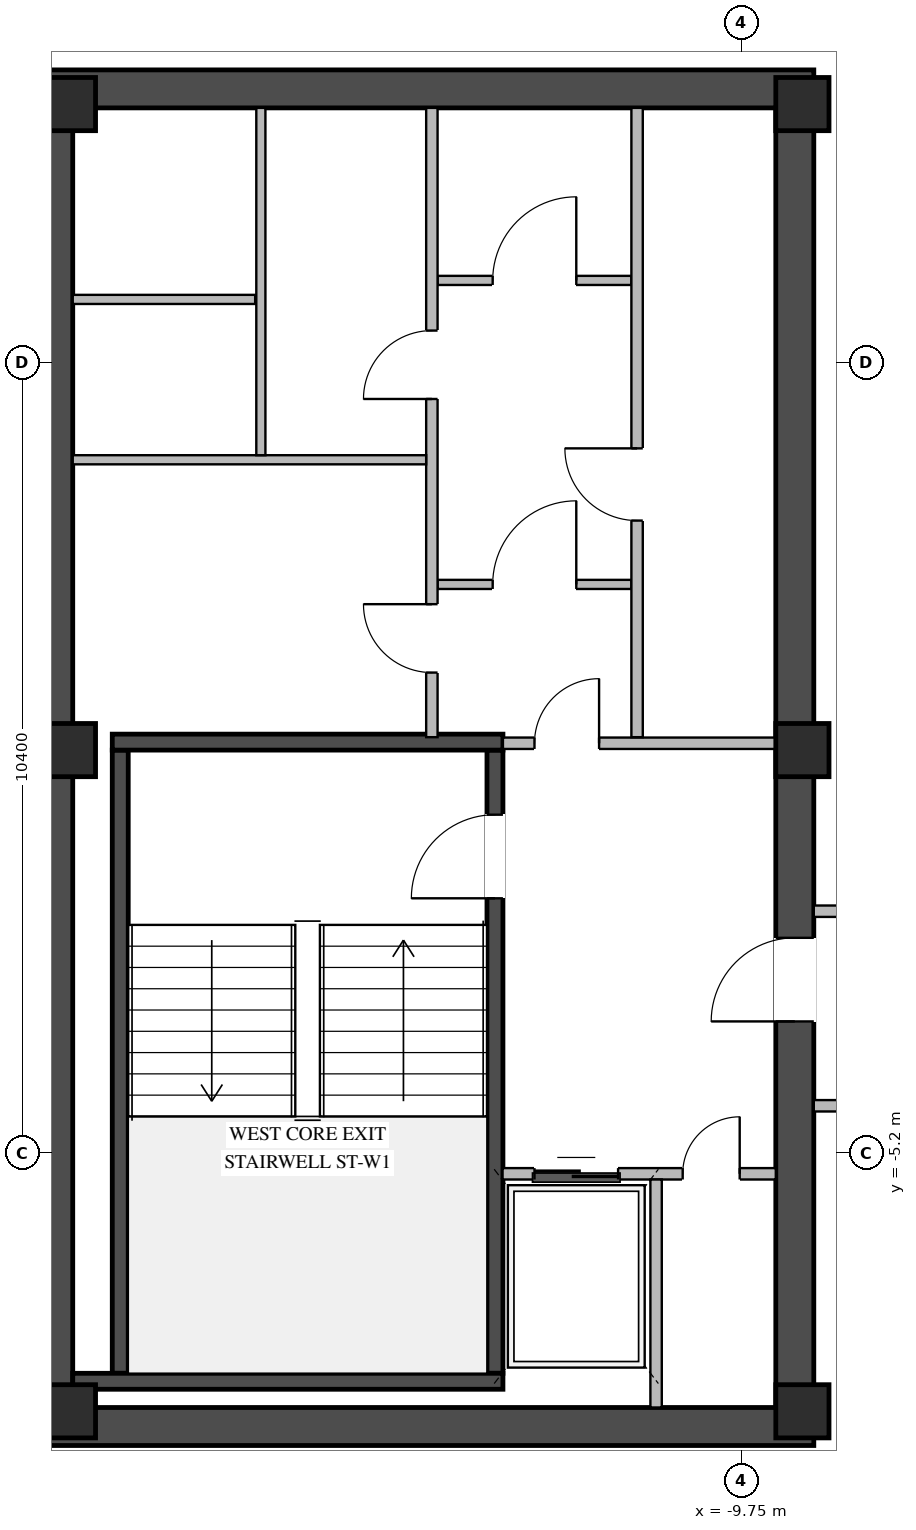
"""IFC4 building model, lengths in metres.
Left out: names, types, materials, properties, quantities, classifications, styles, units other than length and angle.
Written with IfcOpenShell. Run it as: python <this file> out.ifc"""

import sys

from ifc_helpers import new_model, si_unit, direction, frame, frame_2d, origin, origin_2d, place, context, subcontext, project, spatial, rectangle, extrude, element, fill, save


model = new_model("IFC4")
c1 = context("Model", 3, precision=1e-05, world=origin(), true_north=direction((0.0, 1.0)))
c2 = subcontext(c1, "Body", "Model", "MODEL_VIEW")
j1 = project(units=[si_unit("LENGTHUNIT", "METRE"), si_unit("PLANEANGLEUNIT", "RADIAN")], contexts=[c1])
p1 = place(None, origin())
s1 = spatial("IfcSite", under=j1, at=p1, CompositionType="ELEMENT")
p2 = place(p1, origin())
s2 = spatial("IfcBuilding", under=s1, at=p2, CompositionType="ELEMENT")
p3 = place(p2, frame((0.0, 0.0, 297.75)))
s3 = spatial("IfcBuildingStorey", under=s2, at=p3, CompositionType="ELEMENT", Elevation=297.75)
for number, where, z_axis, x_axis in (
    (1, (-19.05, -8.8, 0.0), (0.0, 0.0, 1.0), (1.0, 0.0, 0.0)),
    (2, (-19.05, 8.8, 0.0), (0.0, 0.0, 1.0), (1.0, 0.0, 0.0)),
):
    element("IfcWall", number, at=place(p3, frame(where, z_axis=z_axis, x_axis=x_axis)), inside=s3, PredefinedType="SHEAR", context=c2, shape_type="SweptSolid", body=[
        extrude(rectangle(XDim=10.25, YDim=0.5, at=frame_2d((5.125, 0.0))), origin(), (0.0, 0.0, 1.0), 3.35),
    ])
p4 = place(p3, frame((-18.8, -8.55, 0.0), z_axis=(0.0, 0.0, 1.0), x_axis=(0.0, 1.0, 0.0)))
e3 = element("IfcWall", 3, at=p4, inside=s3, PredefinedType="SHEAR", context=c2, shape_type="SweptSolid", body=[
    extrude(rectangle(XDim=17.1, YDim=0.5, at=frame_2d((8.55, 0.0))), origin(), (0.0, 0.0, 1.0), 3.35),
])
p5 = place(p3, frame((-9.05, -8.55, 0.0), z_axis=(0.0, 0.0, 1.0), x_axis=(0.0, 1.0, 0.0)))
e4 = element("IfcWall", 4, at=p5, inside=s3, PredefinedType="SHEAR", context=c2, shape_type="SweptSolid", body=[
    extrude(rectangle(XDim=17.1, YDim=0.5, at=frame_2d((8.55, 0.0))), origin(), (0.0, 0.0, 1.0), 3.35),
])
p6 = place(p5, frame((5.08, 0.0, 0.0)))
e5 = element("IfcOpeningElement", 5, at=p6, cuts=e4, PredefinedType="OPENING", context=c2, shape_type="SweptSolid", body=[
    extrude(rectangle(XDim=1.1, YDim=2.08, at=frame_2d((0.55, 1.04))), frame((0.0, 0.26, 0.0), z_axis=(0.0, -1.0, 0.0), x_axis=(1.0, 0.0, 0.0)), (0.0, 0.0, 1.0), 0.52),
])
p7 = place(p3, frame((-12.995, -8.1, 0.0), z_axis=(0.0, 0.0, 1.0), x_axis=(0.0, 1.0, 0.0)))
e6 = element("IfcWall", 6, at=p7, inside=s3, PredefinedType="SHEAR", context=c2, shape_type="SweptSolid", body=[
    extrude(rectangle(XDim=8.2, YDim=0.21, at=frame_2d((4.1, 0.0))), origin(), (0.0, 0.0, 1.0), 3.35),
])
p8 = place(p7, frame((6.25, 0.0, 0.0)))
e7 = element("IfcOpeningElement", 7, at=p8, cuts=e6, PredefinedType="OPENING", context=c2, shape_type="SweptSolid", body=[
    extrude(rectangle(XDim=1.1, YDim=2.15, at=frame_2d((0.55, 1.075))), frame((0.0, 0.115, 0.0), z_axis=(0.0, -1.0, 0.0), x_axis=(1.0, 0.0, 0.0)), (0.0, 0.0, 1.0), 0.23),
])
p9 = place(p3, frame((-17.925, -8.1, 0.0), z_axis=(0.0, 0.0, 1.0), x_axis=(0.0, 1.0, 0.0)))
e8 = element("IfcWall", 8, at=p9, inside=s3, PredefinedType="SHEAR", context=c2, shape_type="SweptSolid", body=[
    extrude(rectangle(XDim=8.2, YDim=0.21, at=frame_2d((4.1, 0.0))), origin(), (0.0, 0.0, 1.0), 3.35),
])
p10 = place(p3, frame((-18.55, -8.205, 0.0), z_axis=(0.0, 0.0, 1.0), x_axis=(1.0, 0.0, 0.0)))
e9 = element("IfcWall", 9, at=p10, inside=s3, PredefinedType="SHEAR", context=c2, shape_type="SweptSolid", body=[
    extrude(rectangle(XDim=5.66, YDim=0.21, at=frame_2d((2.83, 0.0))), origin(), (0.0, 0.0, 1.0), 3.35),
])
p11 = place(p3, frame((-12.89, 0.205, 0.0), z_axis=(0.0, 0.0, 1.0), x_axis=(-1.0, 0.0, 0.0)))
e10 = element("IfcWall", 10, at=p11, inside=s3, PredefinedType="SHEAR", context=c2, shape_type="SweptSolid", body=[
    extrude(rectangle(XDim=5.14, YDim=0.21, at=frame_2d((2.57, 0.0))), origin(), (0.0, 0.0, 1.0), 3.35),
])
for number, where, z_axis, x_axis in (
    (11, (-8.95, -8.6, 0.0), (0.0, 0.0, 1.0), (1.0, 0.0, 0.0)),
    (12, (-8.95, 0.1, 0.0), (0.0, 0.0, 1.0), (1.0, 0.0, 0.0)),
    (13, (-8.95, 8.6, 0.0), (0.0, 0.0, 1.0), (1.0, 0.0, 0.0)),
    (14, (-18.6, -8.6, 0.0), (0.0, 0.0, 1.0), (1.0, 0.0, 0.0)),
    (15, (-18.6, 0.1, 0.0), (0.0, 0.0, 1.0), (1.0, 0.0, 0.0)),
    (16, (-18.6, 8.6, 0.0), (0.0, 0.0, 1.0), (1.0, 0.0, 0.0)),
):
    element("IfcColumn", number, at=place(p3, frame(where, z_axis=z_axis, x_axis=x_axis)), inside=s3, PredefinedType="COLUMN", context=c2, shape_type="SweptSolid", body=[
        extrude(rectangle(XDim=0.7, YDim=0.7, at=origin_2d()), origin(), (0.0, 0.0, 1.0), 3.6),
    ])
p12 = place(p3, frame((-12.895, -5.475, 0.0), z_axis=(0.0, 0.0, 1.0), x_axis=(1.0, 0.0, 0.0)))
e17 = element("IfcWall", 17, at=p12, inside=s3, PredefinedType="STANDARD", context=c2, shape_type="SweptSolid", body=[
    extrude(rectangle(XDim=3.595, YDim=0.15, at=frame_2d((1.797, 0.0))), origin(), (0.0, 0.0, 1.0), 3.33),
])
p13 = place(p12, frame((0.42, 0.0, 0.0)))
e18 = element("IfcOpeningElement", 18, at=p13, cuts=e17, PredefinedType="OPENING", context=c2, shape_type="SweptSolid", body=[
    extrude(rectangle(XDim=1.1, YDim=2.15, at=frame_2d((0.55, 1.075))), frame((0.0, 0.085, 0.0), z_axis=(0.0, -1.0, 0.0), x_axis=(1.0, 0.0, 0.0)), (0.0, 0.0, 1.0), 0.17),
])
p14 = place(p12, frame((2.37, 0.0, 0.0)))
e19 = element("IfcOpeningElement", 19, at=p14, cuts=e17, PredefinedType="OPENING", context=c2, shape_type="SweptSolid", body=[
    extrude(rectangle(XDim=0.75, YDim=2.05, at=frame_2d((0.375, 1.025))), frame((0.0, 0.085, 0.0), z_axis=(0.0, -1.0, 0.0), x_axis=(1.0, 0.0, 0.0)), (0.0, 0.0, 1.0), 0.17),
])
p15 = place(p3, frame((-10.875, -8.55, 0.0), z_axis=(0.0, 0.0, 1.0), x_axis=(0.0, 1.0, 0.0)))
e20 = element("IfcWall", 20, at=p15, inside=s3, PredefinedType="STANDARD", context=c2, shape_type="SweptSolid", body=[
    extrude(rectangle(XDim=3.0, YDim=0.15, at=frame_2d((1.5, 0.0))), origin(), (0.0, 0.0, 1.0), 3.33),
])
p16 = place(p3, frame((-12.89, 0.19, 0.0), z_axis=(0.0, 0.0, 1.0), x_axis=(1.0, 0.0, 0.0)))
e21 = element("IfcWall", 21, at=p16, inside=s3, PredefinedType="STANDARD", context=c2, shape_type="SweptSolid", body=[
    extrude(rectangle(XDim=3.59, YDim=0.15, at=frame_2d((1.795, 0.0))), origin(), (0.0, 0.0, 1.0), 2.825),
])
p17 = place(p16, frame((0.415, 0.0, 0.0)))
e22 = element("IfcOpeningElement", 22, at=p17, cuts=e21, PredefinedType="OPENING", context=c2, shape_type="SweptSolid", body=[
    extrude(rectangle(XDim=0.85, YDim=2.04, at=frame_2d((0.425, 1.02))), frame((0.0, 0.085, 0.0), z_axis=(0.0, -1.0, 0.0), x_axis=(1.0, 0.0, 0.0)), (0.0, 0.0, 1.0), 0.17),
])
p18 = place(p3, frame((-13.75, 2.28, 0.0), z_axis=(0.0, 0.0, 1.0), x_axis=(1.0, 0.0, 0.0)))
e23 = element("IfcWall", 23, at=p18, inside=s3, PredefinedType="STANDARD", context=c2, shape_type="SweptSolid", body=[
    extrude(rectangle(XDim=2.55, YDim=0.12, at=frame_2d((1.275, 0.0))), origin(), (0.0, 0.0, 1.0), 3.33),
])
p19 = place(p18, frame((0.725, 0.0, 0.0)))
e24 = element("IfcOpeningElement", 24, at=p19, cuts=e23, PredefinedType="OPENING", context=c2, shape_type="SweptSolid", body=[
    extrude(rectangle(XDim=1.1, YDim=2.1, at=frame_2d((0.55, 1.05))), frame((0.0, 0.07, 0.0), z_axis=(0.0, -1.0, 0.0), x_axis=(1.0, 0.0, 0.0)), (0.0, 0.0, 1.0), 0.14),
])
p20 = place(p3, frame((-13.75, 6.28, 0.0), z_axis=(0.0, 0.0, 1.0), x_axis=(1.0, 0.0, 0.0)))
e25 = element("IfcWall", 25, at=p20, inside=s3, PredefinedType="STANDARD", context=c2, shape_type="SweptSolid", body=[
    extrude(rectangle(XDim=2.55, YDim=0.12, at=frame_2d((1.275, 0.0))), origin(), (0.0, 0.0, 1.0), 3.33),
])
p21 = place(p20, frame((0.725, 0.0, 0.0)))
e26 = element("IfcOpeningElement", 26, at=p21, cuts=e25, PredefinedType="OPENING", context=c2, shape_type="SweptSolid", body=[
    extrude(rectangle(XDim=1.1, YDim=2.1, at=frame_2d((0.55, 1.05))), frame((0.0, 0.07, 0.0), z_axis=(0.0, -1.0, 0.0), x_axis=(1.0, 0.0, 0.0)), (0.0, 0.0, 1.0), 0.14),
])
p22 = place(p3, frame((-11.125, 0.27, 0.0), z_axis=(0.0, 0.0, 1.0), x_axis=(0.0, 1.0, 0.0)))
e27 = element("IfcWall", 27, at=p22, inside=s3, PredefinedType="STANDARD", context=c2, shape_type="SweptSolid", body=[
    extrude(rectangle(XDim=8.28, YDim=0.15, at=frame_2d((4.14, 0.0))), origin(), (0.0, 0.0, 1.0), 3.33),
])
p23 = place(p22, frame((2.85, 0.0, 0.0)))
e28 = element("IfcOpeningElement", 28, at=p23, cuts=e27, PredefinedType="OPENING", context=c2, shape_type="SweptSolid", body=[
    extrude(rectangle(XDim=0.95, YDim=2.05, at=frame_2d((0.475, 1.025))), frame((0.0, 0.085, 0.0), z_axis=(0.0, -1.0, 0.0), x_axis=(1.0, 0.0, 0.0)), (0.0, 0.0, 1.0), 0.17),
])
p24 = place(p3, frame((-13.825, 0.27, 0.0), z_axis=(0.0, 0.0, 1.0), x_axis=(0.0, 1.0, 0.0)))
e29 = element("IfcWall", 29, at=p24, inside=s3, PredefinedType="STANDARD", context=c2, shape_type="SweptSolid", body=[
    extrude(rectangle(XDim=8.28, YDim=0.15, at=frame_2d((4.14, 0.0))), origin(), (0.0, 0.0, 1.0), 3.33),
])
p25 = place(p24, frame((4.45, 0.0, 0.0)))
e30 = element("IfcOpeningElement", 30, at=p25, cuts=e29, PredefinedType="OPENING", context=c2, shape_type="SweptSolid", body=[
    extrude(rectangle(XDim=0.9, YDim=2.05, at=frame_2d((0.45, 1.025))), frame((0.0, 0.085, 0.0), z_axis=(0.0, -1.0, 0.0), x_axis=(1.0, 0.0, 0.0)), (0.0, 0.0, 1.0), 0.17),
])
p26 = place(p24, frame((0.85, 0.0, 0.0)))
e31 = element("IfcOpeningElement", 31, at=p26, cuts=e29, PredefinedType="OPENING", context=c2, shape_type="SweptSolid", body=[
    extrude(rectangle(XDim=0.9, YDim=2.05, at=frame_2d((0.45, 1.025))), frame((0.0, 0.085, 0.0), z_axis=(0.0, -1.0, 0.0), x_axis=(1.0, 0.0, 0.0)), (0.0, 0.0, 1.0), 0.17),
])
p27 = place(p3, frame((-18.55, 3.92, 0.0), z_axis=(0.0, 0.0, 1.0), x_axis=(1.0, 0.0, 0.0)))
e32 = element("IfcWall", 32, at=p27, inside=s3, PredefinedType="STANDARD", context=c2, shape_type="SweptSolid", body=[
    extrude(rectangle(XDim=4.65, YDim=0.12, at=frame_2d((2.325, 0.0))), origin(), (0.0, 0.0, 1.0), 3.33),
])
p28 = place(p3, frame((-18.55, 6.03, 0.0), z_axis=(0.0, 0.0, 1.0), x_axis=(1.0, 0.0, 0.0)))
e33 = element("IfcWall", 33, at=p28, inside=s3, PredefinedType="STANDARD", context=c2, shape_type="SweptSolid", body=[
    extrude(rectangle(XDim=2.4, YDim=0.12, at=frame_2d((1.2, 0.0))), origin(), (0.0, 0.0, 1.0), 3.33),
])
p29 = place(p3, frame((-16.075, 3.98, 0.0), z_axis=(0.0, 0.0, 1.0), x_axis=(0.0, 1.0, 0.0)))
e34 = element("IfcWall", 34, at=p29, inside=s3, PredefinedType="STANDARD", context=c2, shape_type="SweptSolid", body=[
    extrude(rectangle(XDim=4.57, YDim=0.12, at=frame_2d((2.285, 0.0))), origin(), (0.0, 0.0, 1.0), 3.33),
])
p30 = place(p3, frame((-8.8, -2.02, 0.0), z_axis=(0.0, 0.0, 1.0), x_axis=(1.0, 0.0, 0.0)))
e35 = element("IfcWall", 35, at=p30, inside=s3, PredefinedType="STANDARD", context=c2, shape_type="SweptSolid", body=[
    extrude(rectangle(XDim=17.6, YDim=0.15, at=frame_2d((8.8, 0.0))), origin(), (0.0, 0.0, 1.0), 3.33),
])
p31 = place(p30, frame((4.6, 0.0, 0.0)))
e36 = element("IfcOpeningElement", 36, at=p31, cuts=e35, PredefinedType="OPENING", context=c2, shape_type="SweptSolid", body=[
    extrude(rectangle(XDim=1.0, YDim=2.02, at=frame_2d((0.5, 1.01))), frame((0.0, 0.085, 0.0), z_axis=(0.0, -1.0, 0.0), x_axis=(1.0, 0.0, 0.0)), (0.0, 0.0, 1.0), 0.17),
])
p32 = place(p30, frame((13.4, 0.0, 0.0)))
e37 = element("IfcOpeningElement", 37, at=p32, cuts=e35, PredefinedType="OPENING", context=c2, shape_type="SweptSolid", body=[
    extrude(rectangle(XDim=1.0, YDim=2.02, at=frame_2d((0.5, 1.01))), frame((0.0, 0.085, 0.0), z_axis=(0.0, -1.0, 0.0), x_axis=(1.0, 0.0, 0.0)), (0.0, 0.0, 1.0), 0.17),
])
p33 = place(p3, frame((-8.8, -4.58, 0.0), z_axis=(0.0, 0.0, 1.0), x_axis=(1.0, 0.0, 0.0)))
e38 = element("IfcWall", 38, at=p33, inside=s3, PredefinedType="STANDARD", context=c2, shape_type="SweptSolid", body=[
    extrude(rectangle(XDim=17.6, YDim=0.15, at=frame_2d((8.8, 0.0))), origin(), (0.0, 0.0, 1.0), 3.33),
])
p34 = place(p33, frame((4.6, 0.0, 0.0)))
e39 = element("IfcOpeningElement", 39, at=p34, cuts=e38, PredefinedType="OPENING", context=c2, shape_type="SweptSolid", body=[
    extrude(rectangle(XDim=1.0, YDim=2.02, at=frame_2d((0.5, 1.01))), frame((0.0, 0.085, 0.0), z_axis=(0.0, -1.0, 0.0), x_axis=(1.0, 0.0, 0.0)), (0.0, 0.0, 1.0), 0.17),
])
p35 = place(p8, origin())
e40 = element("IfcDoor", 40, at=p35, inside=s3, OperationType="SINGLE_SWING_LEFT", PredefinedType="DOOR", context=c2, shape_type="SweptSolid", body=[
    extrude(rectangle(XDim=1.1, YDim=2.15, at=frame_2d((0.55, 1.075))), frame((0.0, 0.025, 0.0), z_axis=(0.0, -1.0, 0.0), x_axis=(1.0, 0.0, 0.0)), (0.0, 0.0, 1.0), 0.05),
])
fill(e7, e40)
p36 = place(p13, origin())
e41 = element("IfcDoor", 41, at=p36, inside=s3, OperationType="DOUBLE_DOOR_SLIDING", PredefinedType="DOOR", context=c2, shape_type="SweptSolid", body=[
    extrude(rectangle(XDim=1.1, YDim=2.15, at=frame_2d((0.55, 1.075))), frame((0.0, 0.025, 0.0), z_axis=(0.0, -1.0, 0.0), x_axis=(1.0, 0.0, 0.0)), (0.0, 0.0, 1.0), 0.05),
])
fill(e18, e41)
p37 = place(p14, origin())
e42 = element("IfcDoor", 42, at=p37, inside=s3, OperationType="SINGLE_SWING_RIGHT", PredefinedType="DOOR", context=c2, shape_type="SweptSolid", body=[
    extrude(rectangle(XDim=0.75, YDim=2.05, at=frame_2d((0.375, 1.025))), frame((0.0, 0.025, 0.0), z_axis=(0.0, -1.0, 0.0), x_axis=(1.0, 0.0, 0.0)), (0.0, 0.0, 1.0), 0.05),
])
fill(e19, e42)
p38 = place(p17, origin())
e43 = element("IfcDoor", 43, at=p38, inside=s3, OperationType="SINGLE_SWING_RIGHT", PredefinedType="DOOR", context=c2, shape_type="SweptSolid", body=[
    extrude(rectangle(XDim=0.85, YDim=2.04, at=frame_2d((0.425, 1.02))), frame((0.0, 0.025, 0.0), z_axis=(0.0, -1.0, 0.0), x_axis=(1.0, 0.0, 0.0)), (0.0, 0.0, 1.0), 0.05),
])
fill(e22, e43)
p39 = place(p6, origin())
e44 = element("IfcDoor", 44, at=p39, inside=s3, OperationType="SINGLE_SWING_LEFT", PredefinedType="DOOR", context=c2, shape_type="SweptSolid", body=[
    extrude(rectangle(XDim=1.1, YDim=2.08, at=frame_2d((0.55, 1.04))), frame((0.0, 0.205, 0.0), z_axis=(0.0, -1.0, 0.0), x_axis=(1.0, 0.0, 0.0)), (0.0, 0.0, 1.0), 0.05),
])
fill(e5, e44)
p40 = place(p19, origin())
e45 = element("IfcDoor", 45, at=p40, inside=s3, OperationType="SINGLE_SWING_RIGHT", PredefinedType="DOOR", context=c2, shape_type="SweptSolid", body=[
    extrude(rectangle(XDim=1.1, YDim=2.1, at=frame_2d((0.55, 1.05))), frame((0.0, 0.025, 0.0), z_axis=(0.0, -1.0, 0.0), x_axis=(1.0, 0.0, 0.0)), (0.0, 0.0, 1.0), 0.05),
])
fill(e24, e45)
p41 = place(p21, origin())
e46 = element("IfcDoor", 46, at=p41, inside=s3, OperationType="SINGLE_SWING_RIGHT", PredefinedType="DOOR", context=c2, shape_type="SweptSolid", body=[
    extrude(rectangle(XDim=1.1, YDim=2.1, at=frame_2d((0.55, 1.05))), frame((0.0, 0.025, 0.0), z_axis=(0.0, -1.0, 0.0), x_axis=(1.0, 0.0, 0.0)), (0.0, 0.0, 1.0), 0.05),
])
fill(e26, e46)
p42 = place(p23, origin())
e47 = element("IfcDoor", 47, at=p42, inside=s3, OperationType="SINGLE_SWING_RIGHT", PredefinedType="DOOR", context=c2, shape_type="SweptSolid", body=[
    extrude(rectangle(XDim=0.95, YDim=2.05, at=frame_2d((0.475, 1.025))), frame((0.0, 0.025, 0.0), z_axis=(0.0, -1.0, 0.0), x_axis=(1.0, 0.0, 0.0)), (0.0, 0.0, 1.0), 0.05),
])
fill(e28, e47)
p43 = place(p25, origin())
e48 = element("IfcDoor", 48, at=p43, inside=s3, OperationType="SINGLE_SWING_LEFT", PredefinedType="DOOR", context=c2, shape_type="SweptSolid", body=[
    extrude(rectangle(XDim=0.9, YDim=2.05, at=frame_2d((0.45, 1.025))), frame((0.0, 0.025, 0.0), z_axis=(0.0, -1.0, 0.0), x_axis=(1.0, 0.0, 0.0)), (0.0, 0.0, 1.0), 0.05),
])
fill(e30, e48)
p44 = place(p26, origin())
e49 = element("IfcDoor", 49, at=p44, inside=s3, OperationType="SINGLE_SWING_RIGHT", PredefinedType="DOOR", context=c2, shape_type="SweptSolid", body=[
    extrude(rectangle(XDim=0.9, YDim=2.05, at=frame_2d((0.45, 1.025))), frame((0.0, 0.025, 0.0), z_axis=(0.0, -1.0, 0.0), x_axis=(1.0, 0.0, 0.0)), (0.0, 0.0, 1.0), 0.05),
])
fill(e31, e49)
save(model, sys.argv[1])
